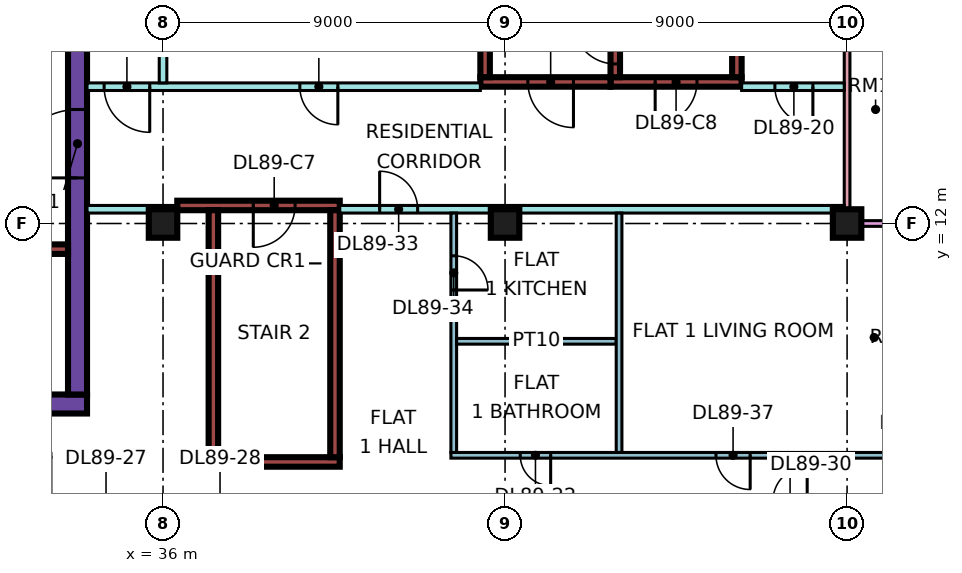
"""IFC4 building model, lengths in metres.
Left out: names, types, materials, properties, quantities, classifications, styles, units other than length and angle.
Written with IfcOpenShell. Run it as: python <this file> out.ifc"""

import sys

from ifc_helpers import new_model, si_unit, direction, frame, frame_2d, origin, origin_2d, place, context, subcontext, project, spatial, rectangle, extrude, element, fill, save


model = new_model("IFC4")
c1 = context("Model", 3, precision=1e-05, world=origin(), true_north=direction((0.0, 1.0)))
c2 = subcontext(c1, "Body", "Model", "MODEL_VIEW")
j1 = project(units=[si_unit("LENGTHUNIT", "METRE"), si_unit("PLANEANGLEUNIT", "RADIAN")], contexts=[c1])
p1 = place(None, origin())
s1 = spatial("IfcSite", under=j1, at=p1, CompositionType="ELEMENT")
p2 = place(p1, origin())
s2 = spatial("IfcBuilding", under=s1, at=p2, CompositionType="ELEMENT")
p3 = place(p2, frame((0.0, 0.0, 380.15)))
s3 = spatial("IfcBuildingStorey", under=s2, at=p3, CompositionType="ELEMENT", Elevation=380.15)
for number, where, z_axis, x_axis in (
    (1, (36.0, 12.0, 0.0), (0.0, 0.0, 1.0), (1.0, 0.0, 0.0)),
    (2, (45.0, 12.0, 0.0), (0.0, 0.0, 1.0), (1.0, 0.0, 0.0)),
    (3, (54.0, 12.0, 0.0), (0.0, 0.0, 1.0), (1.0, 0.0, 0.0)),
):
    element("IfcColumn", number, at=place(p3, frame(where, z_axis=z_axis, x_axis=x_axis)), inside=s3, PredefinedType="COLUMN", context=c2, shape_type="SweptSolid", body=[
        extrude(rectangle(XDim=0.75, YDim=0.75, at=origin_2d()), origin(), (0.0, 0.0, 1.0), 3.75),
    ])
p4 = place(p3, frame((9.0, 7.25, 0.0), z_axis=(0.0, 0.0, 1.0), x_axis=(1.0, 0.0, 0.0)))
e4 = element("IfcWall", 4, at=p4, inside=s3, PredefinedType="SHEAR", context=c2, shape_type="SweptSolid", body=[
    extrude(rectangle(XDim=25.0, YDim=0.5, at=frame_2d((12.5, 0.0))), origin(), (0.0, 0.0, 1.0), 3.75),
])
p5 = place(p3, frame((33.75, 7.5, 0.0), z_axis=(0.0, 0.0, 1.0), x_axis=(0.0, 1.0, 0.0)))
e5 = element("IfcWall", 5, at=p5, inside=s3, PredefinedType="SHEAR", context=c2, shape_type="SweptSolid", body=[
    extrude(rectangle(XDim=12.0, YDim=0.5, at=frame_2d((6.0, 0.0))), origin(), (0.0, 0.0, 1.0), 3.75),
])
p6 = place(p5, frame((5.7, 0.0, 0.0)))
e6 = element("IfcOpeningElement", 6, at=p6, cuts=e5, PredefinedType="OPENING", context=c2, shape_type="SweptSolid", body=[
    extrude(rectangle(XDim=1.8, YDim=2.4, at=frame_2d((0.9, 1.2))), frame((0.0, 0.26, 0.0), z_axis=(0.0, -1.0, 0.0), x_axis=(1.0, 0.0, 0.0)), (0.0, 0.0, 1.0), 0.52),
])
p7 = place(p3, frame((13.45, 11.325, 0.0), z_axis=(0.0, 0.0, 1.0), x_axis=(1.0, 0.0, 0.0)))
e7 = element("IfcWall", 7, at=p7, inside=s3, PredefinedType="SHEAR", context=c2, shape_type="SweptSolid", body=[
    extrude(rectangle(XDim=20.05, YDim=0.25, at=frame_2d((10.025, 0.0))), origin(), (0.0, 0.0, 1.0), 3.75),
])
p8 = place(p7, frame((4.925, 0.0, 0.0)))
e8 = element("IfcOpeningElement", 8, at=p8, cuts=e7, PredefinedType="OPENING", context=c2, shape_type="SweptSolid", body=[
    extrude(rectangle(XDim=0.9, YDim=2.1, at=frame_2d((0.45, 1.05))), frame((0.0, 0.135, 0.0), z_axis=(0.0, -1.0, 0.0), x_axis=(1.0, 0.0, 0.0)), (0.0, 0.0, 1.0), 0.27),
])
p9 = place(p7, frame((12.3, 0.0, 0.0)))
e9 = element("IfcOpeningElement", 9, at=p9, cuts=e7, PredefinedType="OPENING", context=c2, shape_type="SweptSolid", body=[
    extrude(rectangle(XDim=0.9, YDim=2.1, at=frame_2d((0.45, 1.05))), frame((0.0, 0.135, 0.0), z_axis=(0.0, -1.0, 0.0), x_axis=(1.0, 0.0, 0.0)), (0.0, 0.0, 1.0), 0.27),
])
p10 = place(p7, frame((16.825, 0.0, 0.0)))
e10 = element("IfcOpeningElement", 10, at=p10, cuts=e7, PredefinedType="OPENING", context=c2, shape_type="SweptSolid", body=[
    extrude(rectangle(XDim=0.9, YDim=2.1, at=frame_2d((0.45, 1.05))), frame((0.0, 0.135, 0.0), z_axis=(0.0, -1.0, 0.0), x_axis=(1.0, 0.0, 0.0)), (0.0, 0.0, 1.0), 0.27),
])
p11 = place(p3, frame((37.2, 5.725, 0.0), z_axis=(0.0, 0.0, 1.0), x_axis=(1.0, 0.0, 0.0)))
e11 = element("IfcWall", 11, at=p11, inside=s3, PredefinedType="SHEAR", context=c2, shape_type="SweptSolid", body=[
    extrude(rectangle(XDim=3.45, YDim=0.25, at=frame_2d((1.725, 0.0))), origin(), (0.0, 0.0, 1.0), 3.75),
])
p12 = place(p3, frame((36.375, 12.475, 0.0), z_axis=(0.0, 0.0, 1.0), x_axis=(1.0, 0.0, 0.0)))
e12 = element("IfcWall", 12, at=p12, inside=s3, PredefinedType="SHEAR", context=c2, shape_type="SweptSolid", body=[
    extrude(rectangle(XDim=4.275, YDim=0.25, at=frame_2d((2.137, 0.0))), origin(), (0.0, 0.0, 1.0), 3.75),
])
p13 = place(p12, frame((2.0, 0.0, 0.0)))
e13 = element("IfcOpeningElement", 13, at=p13, cuts=e12, PredefinedType="OPENING", context=c2, shape_type="SweptSolid", body=[
    extrude(rectangle(XDim=1.1, YDim=2.2, at=frame_2d((0.55, 1.1))), frame((0.0, 0.135, 0.0), z_axis=(0.0, -1.0, 0.0), x_axis=(1.0, 0.0, 0.0)), (0.0, 0.0, 1.0), 0.27),
])
for number, where, z_axis, x_axis in (
    (14, (37.325, 5.85, 0.0), (0.0, 0.0, 1.0), (0.0, 1.0, 0.0)),
    (15, (40.525, 5.85, 0.0), (0.0, 0.0, 1.0), (0.0, 1.0, 0.0)),
):
    element("IfcWall", number, at=place(p3, frame(where, z_axis=z_axis, x_axis=x_axis)), inside=s3, PredefinedType="SHEAR", context=c2, shape_type="SweptSolid", body=[
        extrude(rectangle(XDim=6.5, YDim=0.25, at=frame_2d((3.25, 0.0))), origin(), (0.0, 0.0, 1.0), 3.75),
    ])
p14 = place(p3, frame((47.775, 15.725, 0.0), z_axis=(0.0, 0.0, 1.0), x_axis=(1.0, 0.0, 0.0)))
e16 = element("IfcWall", 16, at=p14, inside=s3, PredefinedType="SHEAR", context=c2, shape_type="SweptSolid", body=[
    extrude(rectangle(XDim=3.45, YDim=0.25, at=frame_2d((1.725, 0.0))), origin(), (0.0, 0.0, 1.0), 3.75),
])
p15 = place(p14, frame((1.175, 0.0, 0.0)))
e17 = element("IfcOpeningElement", 17, at=p15, cuts=e16, PredefinedType="OPENING", context=c2, shape_type="SweptSolid", body=[
    extrude(rectangle(XDim=1.1, YDim=2.2, at=frame_2d((0.55, 1.1))), frame((0.0, 0.135, 0.0), z_axis=(0.0, -1.0, 0.0), x_axis=(1.0, 0.0, 0.0)), (0.0, 0.0, 1.0), 0.27),
])
p16 = place(p3, frame((47.9, 15.85, 0.0), z_axis=(0.0, 0.0, 1.0), x_axis=(0.0, 1.0, 0.0)))
e18 = element("IfcWall", 18, at=p16, inside=s3, PredefinedType="SHEAR", context=c2, shape_type="SweptSolid", body=[
    extrude(rectangle(XDim=6.5, YDim=0.25, at=frame_2d((3.25, 0.0))), origin(), (0.0, 0.0, 1.0), 3.75),
])
p17 = place(p16, frame((0.35, 0.0, 0.0)))
e19 = element("IfcOpeningElement", 19, at=p17, cuts=e18, PredefinedType="OPENING", context=c2, shape_type="SweptSolid", body=[
    extrude(rectangle(XDim=1.1, YDim=2.2, at=frame_2d((0.55, 1.1))), frame((0.0, 0.135, 0.0), z_axis=(0.0, -1.0, 0.0), x_axis=(1.0, 0.0, 0.0)), (0.0, 0.0, 1.0), 0.27),
])
p18 = place(p3, frame((51.1, 15.85, 0.0), z_axis=(0.0, 0.0, 1.0), x_axis=(0.0, 1.0, 0.0)))
e20 = element("IfcWall", 20, at=p18, inside=s3, PredefinedType="SHEAR", context=c2, shape_type="SweptSolid", body=[
    extrude(rectangle(XDim=6.5, YDim=0.25, at=frame_2d((3.25, 0.0))), origin(), (0.0, 0.0, 1.0), 3.75),
])
p19 = place(p3, frame((44.35, 15.725, 0.0), z_axis=(0.0, 0.0, 1.0), x_axis=(1.0, 0.0, 0.0)))
e21 = element("IfcWall", 21, at=p19, inside=s3, PredefinedType="SHEAR", context=c2, shape_type="SweptSolid", body=[
    extrude(rectangle(XDim=3.425, YDim=0.25, at=frame_2d((1.712, 0.0))), origin(), (0.0, 0.0, 1.0), 3.75),
])
p20 = place(p19, frame((1.25, 0.0, 0.0)))
e22 = element("IfcOpeningElement", 22, at=p20, cuts=e21, PredefinedType="OPENING", context=c2, shape_type="SweptSolid", body=[
    extrude(rectangle(XDim=1.2, YDim=2.2, at=frame_2d((0.6, 1.1))), frame((0.0, 0.135, 0.0), z_axis=(0.0, -1.0, 0.0), x_axis=(1.0, 0.0, 0.0)), (0.0, 0.0, 1.0), 0.27),
])
p21 = place(p3, frame((44.475, 15.85, 0.0), z_axis=(0.0, 0.0, 1.0), x_axis=(0.0, 1.0, 0.0)))
e23 = element("IfcWall", 23, at=p21, inside=s3, PredefinedType="SHEAR", context=c2, shape_type="SweptSolid", body=[
    extrude(rectangle(XDim=6.5, YDim=0.25, at=frame_2d((3.25, 0.0))), origin(), (0.0, 0.0, 1.0), 3.75),
])
p22 = place(p21, frame((1.75, 0.0, 0.0)))
e24 = element("IfcOpeningElement", 24, at=p22, cuts=e23, PredefinedType="OPENING", context=c2, shape_type="SweptSolid", body=[
    extrude(rectangle(XDim=1.1, YDim=2.2, at=frame_2d((0.55, 1.1))), frame((0.0, 0.135, 0.0), z_axis=(0.0, -1.0, 0.0), x_axis=(1.0, 0.0, 0.0)), (0.0, 0.0, 1.0), 0.27),
])
p23 = place(p21, frame((4.3, 0.0, 0.0)))
e25 = element("IfcOpeningElement", 25, at=p23, cuts=e23, PredefinedType="OPENING", context=c2, shape_type="SweptSolid", body=[
    extrude(rectangle(XDim=1.1, YDim=2.2, at=frame_2d((0.55, 1.1))), frame((0.0, 0.135, 0.0), z_axis=(0.0, -1.0, 0.0), x_axis=(1.0, 0.0, 0.0)), (0.0, 0.0, 1.0), 0.27),
])
p24 = place(p3, frame((54.0, 12.075, 0.0), z_axis=(0.0, 0.0, 1.0), x_axis=(0.0, 1.0, 0.0)))
e26 = element("IfcWall", 26, at=p24, inside=s3, PredefinedType="SOLIDWALL", context=c2, shape_type="SweptSolid", body=[
    extrude(rectangle(XDim=10.35, YDim=0.15, at=frame_2d((5.175, 0.0))), origin(), (0.0, 0.0, 1.0), 3.3),
])
p25 = place(p24, frame((4.538, 0.0, 0.45)))
e27 = element("IfcOpeningElement", 27, at=p25, cuts=e26, PredefinedType="OPENING", context=c2, shape_type="SweptSolid", body=[
    extrude(rectangle(XDim=4.8, YDim=2.0, at=frame_2d((2.4, 1.0))), frame((0.0, 0.085, 0.0), z_axis=(0.0, -1.0, 0.0), x_axis=(1.0, 0.0, 0.0)), (0.0, 0.0, 1.0), 0.17),
])
p26 = place(p3, frame((55.5, 12.0, 0.0), z_axis=(0.0, 0.0, 1.0), x_axis=(-1.0, 0.0, 0.0)))
e28 = element("IfcWall", 28, at=p26, inside=s3, PredefinedType="SOLIDWALL", context=c2, shape_type="SweptSolid", body=[
    extrude(rectangle(XDim=1.5, YDim=0.15, at=frame_2d((0.75, 0.0))), origin(), (0.0, 0.0, 1.0), 3.3),
])
p27 = place(p3, frame((34.0, 12.375, 0.0), z_axis=(0.0, 0.0, 1.0), x_axis=(1.0, 0.0, 0.0)))
e29 = element("IfcWall", 29, at=p27, inside=s3, PredefinedType="PARTITIONING", context=c2, shape_type="SweptSolid", body=[
    extrude(rectangle(XDim=2.376, YDim=0.2, at=frame_2d((1.188, 0.0))), origin(), (0.0, 0.0, 1.0), 3.3),
])
p28 = place(p3, frame((34.0, 15.6, 0.0), z_axis=(0.0, 0.0, 1.0), x_axis=(1.0, 0.0, 0.0)))
e30 = element("IfcWall", 30, at=p28, inside=s3, PredefinedType="PARTITIONING", context=c2, shape_type="SweptSolid", body=[
    extrude(rectangle(XDim=10.35, YDim=0.2, at=frame_2d((5.175, 0.0))), origin(), (0.0, 0.0, 1.0), 3.3),
])
p29 = place(p28, frame((5.6, 0.0, 0.0)))
e31 = element("IfcOpeningElement", 31, at=p29, cuts=e30, PredefinedType="OPENING", context=c2, shape_type="SweptSolid", body=[
    extrude(rectangle(XDim=1.0, YDim=2.1, at=frame_2d((0.5, 1.05))), frame((0.0, 0.11, 0.0), z_axis=(0.0, -1.0, 0.0), x_axis=(1.0, 0.0, 0.0)), (0.0, 0.0, 1.0), 0.22),
])
p30 = place(p28, frame((0.45, 0.0, 0.0)))
e32 = element("IfcOpeningElement", 32, at=p30, cuts=e30, PredefinedType="OPENING", context=c2, shape_type="SweptSolid", body=[
    extrude(rectangle(XDim=1.2, YDim=2.1, at=frame_2d((0.6, 1.05))), frame((0.0, 0.11, 0.0), z_axis=(0.0, -1.0, 0.0), x_axis=(1.0, 0.0, 0.0)), (0.0, 0.0, 1.0), 0.22),
])
p31 = place(p3, frame((36.0, 15.7, 0.0), z_axis=(0.0, 0.0, 1.0), x_axis=(0.0, 1.0, 0.0)))
e33 = element("IfcWall", 33, at=p31, inside=s3, PredefinedType="PARTITIONING", context=c2, shape_type="SweptSolid", body=[
    extrude(rectangle(XDim=8.3, YDim=0.2, at=frame_2d((4.15, 0.0))), origin(), (0.0, 0.0, 1.0), 3.3),
])
p32 = place(p3, frame((40.65, 12.375, 0.0), z_axis=(0.0, 0.0, 1.0), x_axis=(1.0, 0.0, 0.0)))
e34 = element("IfcWall", 34, at=p32, inside=s3, PredefinedType="PARTITIONING", context=c2, shape_type="SweptSolid", body=[
    extrude(rectangle(XDim=13.276, YDim=0.2, at=frame_2d((6.638, 0.0))), origin(), (0.0, 0.0, 1.0), 3.3),
])
p33 = place(p32, frame((1.05, 0.0, 0.0)))
e35 = element("IfcOpeningElement", 35, at=p33, cuts=e34, PredefinedType="OPENING", context=c2, shape_type="SweptSolid", body=[
    extrude(rectangle(XDim=1.0, YDim=2.1, at=frame_2d((0.5, 1.05))), frame((0.0, 0.11, 0.0), z_axis=(0.0, -1.0, 0.0), x_axis=(1.0, 0.0, 0.0)), (0.0, 0.0, 1.0), 0.22),
])
p34 = place(p3, frame((43.575, 5.9, 0.0), z_axis=(0.0, 0.0, 1.0), x_axis=(1.0, 0.0, 0.0)))
e36 = element("IfcWall", 36, at=p34, inside=s3, PredefinedType="PARTITIONING", context=c2, shape_type="SweptSolid", body=[
    extrude(rectangle(XDim=11.775, YDim=0.15, at=frame_2d((5.888, 0.0))), origin(), (0.0, 0.0, 1.0), 3.3),
])
p35 = place(p34, frame((1.825, 0.0, 0.0)))
e37 = element("IfcOpeningElement", 37, at=p35, cuts=e36, PredefinedType="OPENING", context=c2, shape_type="SweptSolid", body=[
    extrude(rectangle(XDim=0.8, YDim=2.1, at=frame_2d((0.4, 1.05))), frame((0.0, 0.085, 0.0), z_axis=(0.0, -1.0, 0.0), x_axis=(1.0, 0.0, 0.0)), (0.0, 0.0, 1.0), 0.17),
])
p36 = place(p34, frame((6.975, 0.0, 0.0)))
e38 = element("IfcOpeningElement", 38, at=p36, cuts=e36, PredefinedType="OPENING", context=c2, shape_type="SweptSolid", body=[
    extrude(rectangle(XDim=0.9, YDim=2.1, at=frame_2d((0.45, 1.05))), frame((0.0, 0.085, 0.0), z_axis=(0.0, -1.0, 0.0), x_axis=(1.0, 0.0, 0.0)), (0.0, 0.0, 1.0), 0.17),
])
p37 = place(p3, frame((43.65, 5.975, 0.0), z_axis=(0.0, 0.0, 1.0), x_axis=(0.0, 1.0, 0.0)))
e39 = element("IfcWall", 39, at=p37, inside=s3, PredefinedType="PARTITIONING", context=c2, shape_type="SweptSolid", body=[
    extrude(rectangle(XDim=6.3, YDim=0.15, at=frame_2d((3.15, 0.0))), origin(), (0.0, 0.0, 1.0), 3.3),
])
p38 = place(p37, frame((4.275, 0.0, 0.0)))
e40 = element("IfcOpeningElement", 40, at=p38, cuts=e39, PredefinedType="OPENING", context=c2, shape_type="SweptSolid", body=[
    extrude(rectangle(XDim=0.9, YDim=2.1, at=frame_2d((0.45, 1.05))), frame((0.0, 0.085, 0.0), z_axis=(0.0, -1.0, 0.0), x_axis=(1.0, 0.0, 0.0)), (0.0, 0.0, 1.0), 0.17),
])
p39 = place(p3, frame((43.725, 8.9, 0.0), z_axis=(0.0, 0.0, 1.0), x_axis=(1.0, 0.0, 0.0)))
e41 = element("IfcWall", 41, at=p39, inside=s3, PredefinedType="PARTITIONING", context=c2, shape_type="SweptSolid", body=[
    extrude(rectangle(XDim=4.2, YDim=0.15, at=frame_2d((2.1, 0.0))), origin(), (0.0, 0.0, 1.0), 3.3),
])
p40 = place(p3, frame((48.0, 5.975, 0.0), z_axis=(0.0, 0.0, 1.0), x_axis=(0.0, 1.0, 0.0)))
e42 = element("IfcWall", 42, at=p40, inside=s3, PredefinedType="PARTITIONING", context=c2, shape_type="SweptSolid", body=[
    extrude(rectangle(XDim=6.3, YDim=0.15, at=frame_2d((3.15, 0.0))), origin(), (0.0, 0.0, 1.0), 3.3),
])
p41 = place(p3, frame((51.225, 15.6, 0.0), z_axis=(0.0, 0.0, 1.0), x_axis=(1.0, 0.0, 0.0)))
e43 = element("IfcWall", 43, at=p41, inside=s3, PredefinedType="PARTITIONING", context=c2, shape_type="SweptSolid", body=[
    extrude(rectangle(XDim=2.701, YDim=0.2, at=frame_2d((1.351, 0.0))), origin(), (0.0, 0.0, 1.0), 3.3),
])
p42 = place(p41, frame((0.875, 0.0, 0.0)))
e44 = element("IfcOpeningElement", 44, at=p42, cuts=e43, PredefinedType="OPENING", context=c2, shape_type="SweptSolid", body=[
    extrude(rectangle(XDim=1.0, YDim=2.1, at=frame_2d((0.5, 1.05))), frame((0.0, 0.11, 0.0), z_axis=(0.0, -1.0, 0.0), x_axis=(1.0, 0.0, 0.0)), (0.0, 0.0, 1.0), 0.22),
])
p43 = place(p6, origin())
e45 = element("IfcDoor", 45, at=p43, inside=s3, OperationType="DOUBLE_DOOR_SINGLE_SWING", PredefinedType="DOOR", context=c2, shape_type="SweptSolid", body=[
    extrude(rectangle(XDim=1.8, YDim=2.4, at=frame_2d((0.9, 1.2))), frame((0.0, 0.025, 0.0), z_axis=(0.0, -1.0, 0.0), x_axis=(1.0, 0.0, 0.0)), (0.0, 0.0, 1.0), 0.05),
])
fill(e6, e45)
p44 = place(p13, frame((1.1, 0.0, 0.0), z_axis=(0.0, 0.0, 1.0), x_axis=(-1.0, 0.0, 0.0)))
e46 = element("IfcDoor", 46, at=p44, inside=s3, OperationType="SINGLE_SWING_LEFT", PredefinedType="DOOR", context=c2, shape_type="SweptSolid", body=[
    extrude(rectangle(XDim=1.1, YDim=2.2, at=frame_2d((0.55, 1.1))), frame((0.0, 0.025, 0.0), z_axis=(0.0, -1.0, 0.0), x_axis=(1.0, 0.0, 0.0)), (0.0, 0.0, 1.0), 0.05),
])
fill(e13, e46)
p45 = place(p15, frame((1.1, 0.0, 0.0), z_axis=(0.0, 0.0, 1.0), x_axis=(-1.0, 0.0, 0.0)))
e47 = element("IfcDoor", 47, at=p45, inside=s3, OperationType="SINGLE_SWING_LEFT", PredefinedType="DOOR", context=c2, shape_type="SweptSolid", body=[
    extrude(rectangle(XDim=1.1, YDim=2.2, at=frame_2d((0.55, 1.1))), frame((0.0, 0.025, 0.0), z_axis=(0.0, -1.0, 0.0), x_axis=(1.0, 0.0, 0.0)), (0.0, 0.0, 1.0), 0.05),
])
fill(e17, e47)
p46 = place(p20, origin())
e48 = element("IfcDoor", 48, at=p46, inside=s3, OperationType="SINGLE_SWING_RIGHT", PredefinedType="DOOR", context=c2, shape_type="SweptSolid", body=[
    extrude(rectangle(XDim=1.2, YDim=2.2, at=frame_2d((0.6, 1.1))), frame((0.0, 0.025, 0.0), z_axis=(0.0, -1.0, 0.0), x_axis=(1.0, 0.0, 0.0)), (0.0, 0.0, 1.0), 0.05),
])
fill(e22, e48)
p47 = place(p17, frame((1.1, 0.0, 0.0), z_axis=(0.0, 0.0, 1.0), x_axis=(-1.0, 0.0, 0.0)))
e49 = element("IfcDoor", 49, at=p47, inside=s3, OperationType="SINGLE_SWING_RIGHT", PredefinedType="DOOR", context=c2, shape_type="SweptSolid", body=[
    extrude(rectangle(XDim=1.1, YDim=2.2, at=frame_2d((0.55, 1.1))), frame((0.0, 0.025, 0.0), z_axis=(0.0, -1.0, 0.0), x_axis=(1.0, 0.0, 0.0)), (0.0, 0.0, 1.0), 0.05),
])
fill(e19, e49)
p48 = place(p29, origin())
e50 = element("IfcDoor", 50, at=p48, inside=s3, OperationType="SINGLE_SWING_RIGHT", PredefinedType="DOOR", context=c2, shape_type="SweptSolid", body=[
    extrude(rectangle(XDim=1.0, YDim=2.1, at=frame_2d((0.5, 1.05))), frame((0.0, 0.025, 0.0), z_axis=(0.0, -1.0, 0.0), x_axis=(1.0, 0.0, 0.0)), (0.0, 0.0, 1.0), 0.05),
])
fill(e31, e50)
p49 = place(p30, origin())
e51 = element("IfcDoor", 51, at=p49, inside=s3, OperationType="SINGLE_SWING_RIGHT", PredefinedType="DOOR", context=c2, shape_type="SweptSolid", body=[
    extrude(rectangle(XDim=1.2, YDim=2.1, at=frame_2d((0.6, 1.05))), frame((0.0, 0.025, 0.0), z_axis=(0.0, -1.0, 0.0), x_axis=(1.0, 0.0, 0.0)), (0.0, 0.0, 1.0), 0.05),
])
fill(e32, e51)
p50 = place(p42, origin())
e52 = element("IfcDoor", 52, at=p50, inside=s3, OperationType="SINGLE_SWING_RIGHT", PredefinedType="DOOR", context=c2, shape_type="SweptSolid", body=[
    extrude(rectangle(XDim=1.0, YDim=2.1, at=frame_2d((0.5, 1.05))), frame((0.0, 0.025, 0.0), z_axis=(0.0, -1.0, 0.0), x_axis=(1.0, 0.0, 0.0)), (0.0, 0.0, 1.0), 0.05),
])
fill(e44, e52)
p51 = place(p35, origin())
e53 = element("IfcDoor", 53, at=p51, inside=s3, OperationType="SINGLE_SWING_RIGHT", PredefinedType="DOOR", context=c2, shape_type="SweptSolid", body=[
    extrude(rectangle(XDim=0.8, YDim=2.1, at=frame_2d((0.4, 1.05))), frame((0.0, 0.025, 0.0), z_axis=(0.0, -1.0, 0.0), x_axis=(1.0, 0.0, 0.0)), (0.0, 0.0, 1.0), 0.05),
])
fill(e37, e53)
p52 = place(p33, origin())
e54 = element("IfcDoor", 54, at=p52, inside=s3, OperationType="SINGLE_SWING_LEFT", PredefinedType="DOOR", context=c2, shape_type="SweptSolid", body=[
    extrude(rectangle(XDim=1.0, YDim=2.1, at=frame_2d((0.5, 1.05))), frame((0.0, 0.025, 0.0), z_axis=(0.0, -1.0, 0.0), x_axis=(1.0, 0.0, 0.0)), (0.0, 0.0, 1.0), 0.05),
])
fill(e35, e54)
p53 = place(p38, frame((0.9, 0.0, 0.0), z_axis=(0.0, 0.0, 1.0), x_axis=(-1.0, 0.0, 0.0)))
e55 = element("IfcDoor", 55, at=p53, inside=s3, OperationType="SINGLE_SWING_LEFT", PredefinedType="DOOR", context=c2, shape_type="SweptSolid", body=[
    extrude(rectangle(XDim=0.9, YDim=2.1, at=frame_2d((0.45, 1.05))), frame((0.0, 0.025, 0.0), z_axis=(0.0, -1.0, 0.0), x_axis=(1.0, 0.0, 0.0)), (0.0, 0.0, 1.0), 0.05),
])
fill(e40, e55)
p54 = place(p36, origin())
e56 = element("IfcDoor", 56, at=p54, inside=s3, OperationType="SINGLE_SWING_RIGHT", PredefinedType="DOOR", context=c2, shape_type="SweptSolid", body=[
    extrude(rectangle(XDim=0.9, YDim=2.1, at=frame_2d((0.45, 1.05))), frame((0.0, 0.025, 0.0), z_axis=(0.0, -1.0, 0.0), x_axis=(1.0, 0.0, 0.0)), (0.0, 0.0, 1.0), 0.05),
])
fill(e38, e56)
save(model, sys.argv[1])
